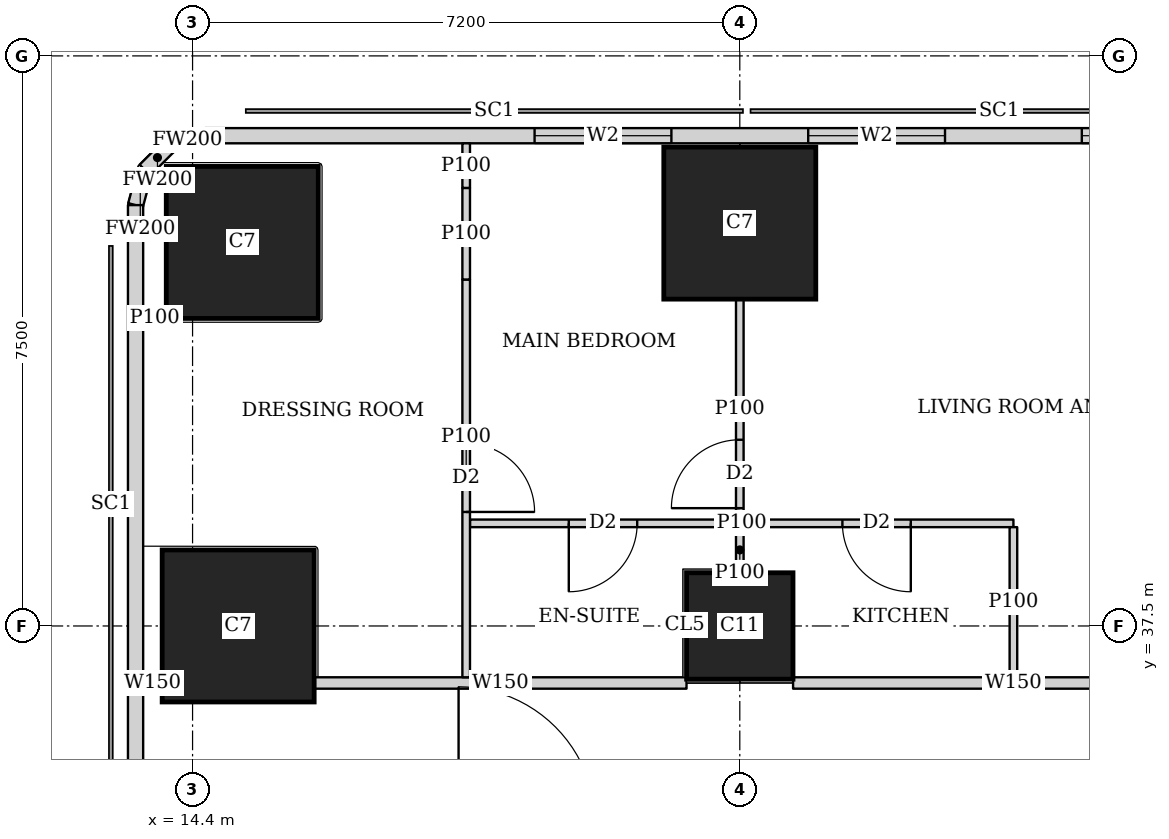
"""IFC4 building model, lengths in metres.
Left out: names, types, materials, properties, quantities, classifications, styles, units other than length and angle.
Written with IfcOpenShell. Run it as: python <this file> out.ifc"""

import sys

from ifc_helpers import new_model, si_unit, direction, frame, frame_2d, origin, origin_2d, place, context, subcontext, project, spatial, rectangle, extrude, element, fill, save


model = new_model("IFC4")
c1 = context("Model", 3, precision=1e-05, world=origin(), true_north=direction((0.0, 1.0)))
c2 = subcontext(c1, "Body", "Model", "MODEL_VIEW")
j1 = project(units=[si_unit("LENGTHUNIT", "METRE"), si_unit("PLANEANGLEUNIT", "RADIAN")], contexts=[c1])
p1 = place(None, origin())
s1 = spatial("IfcSite", under=j1, at=p1, CompositionType="ELEMENT")
p2 = place(p1, origin())
s2 = spatial("IfcBuilding", under=s1, at=p2, CompositionType="ELEMENT")
p3 = place(p2, frame((0.0, 0.0, 285.35)))
s3 = spatial("IfcBuildingStorey", under=s2, at=p3, CompositionType="ELEMENT", Elevation=285.35)
p4 = place(p3, frame((15.0, 37.5, 0.0), z_axis=(0.0, 0.0, 1.0), x_axis=(1.0, 0.0, 0.0)))
e1 = element("IfcColumn", 1, at=p4, inside=s3, PredefinedType="COLUMN", context=c2, shape_type="SweptSolid", body=[
    extrude(rectangle(XDim=2.0, YDim=2.0, at=origin_2d()), origin(), (0.0, 0.0, 1.0), 3.75),
])
p5 = place(p3, frame((21.6, 37.5, 0.0), z_axis=(0.0, 0.0, 1.0), x_axis=(1.0, 0.0, 0.0)))
e2 = element("IfcColumn", 2, at=p5, inside=s3, PredefinedType="COLUMN", context=c2, shape_type="SweptSolid", body=[
    extrude(rectangle(XDim=1.4, YDim=1.4, at=origin_2d()), origin(), (0.0, 0.0, 1.0), 3.75),
])
for number, where, z_axis, x_axis in (
    (3, (15.054, 42.546, 0.0), (0.0, 0.0, 1.0), (1.0, 0.0, 0.0)),
    (4, (21.6, 42.8, 0.0), (0.0, 0.0, 1.0), (1.0, 0.0, 0.0)),
):
    element("IfcColumn", number, at=place(p3, frame(where, z_axis=z_axis, x_axis=x_axis)), inside=s3, PredefinedType="COLUMN", context=c2, shape_type="SweptSolid", body=[
        extrude(rectangle(XDim=2.0, YDim=2.0, at=origin_2d()), origin(), (0.0, 0.0, 1.0), 3.75),
    ])
p6 = place(p3, frame((42.103, 43.95, 0.0), z_axis=(0.0, 0.0, 1.0), x_axis=(-1.0, 0.0, 0.0)))
e5 = element("IfcWall", 5, at=p6, inside=s3, PredefinedType="SOLIDWALL", context=c2, shape_type="SweptSolid", body=[
    extrude(rectangle(XDim=27.54, YDim=0.2, at=frame_2d((13.77, 0.0))), origin(), (0.0, 0.0, 1.0), 3.5),
])
p7 = place(p6, frame((10.603, 0.0, 0.9)))
e6 = element("IfcOpeningElement", 6, at=p7, cuts=e5, PredefinedType="OPENING", context=c2, shape_type="SweptSolid", body=[
    extrude(rectangle(XDim=1.8, YDim=1.5, at=frame_2d((0.9, 0.75))), frame((0.0, 0.11, 0.0), z_axis=(0.0, -1.0, 0.0), x_axis=(1.0, 0.0, 0.0)), (0.0, 0.0, 1.0), 0.22),
])
p8 = place(p6, frame((14.203, 0.0, 0.9)))
e7 = element("IfcOpeningElement", 7, at=p8, cuts=e5, PredefinedType="OPENING", context=c2, shape_type="SweptSolid", body=[
    extrude(rectangle(XDim=1.8, YDim=1.5, at=frame_2d((0.9, 0.75))), frame((0.0, 0.11, 0.0), z_axis=(0.0, -1.0, 0.0), x_axis=(1.0, 0.0, 0.0)), (0.0, 0.0, 1.0), 0.22),
])
p9 = place(p6, frame((17.803, 0.0, 0.9)))
e8 = element("IfcOpeningElement", 8, at=p9, cuts=e5, PredefinedType="OPENING", context=c2, shape_type="SweptSolid", body=[
    extrude(rectangle(XDim=1.8, YDim=1.5, at=frame_2d((0.9, 0.75))), frame((0.0, 0.11, 0.0), z_axis=(0.0, -1.0, 0.0), x_axis=(1.0, 0.0, 0.0)), (0.0, 0.0, 1.0), 0.22),
])
p10 = place(p6, frame((21.403, 0.0, 0.9)))
e9 = element("IfcOpeningElement", 9, at=p10, cuts=e5, PredefinedType="OPENING", context=c2, shape_type="SweptSolid", body=[
    extrude(rectangle(XDim=1.8, YDim=1.5, at=frame_2d((0.9, 0.75))), frame((0.0, 0.11, 0.0), z_axis=(0.0, -1.0, 0.0), x_axis=(1.0, 0.0, 0.0)), (0.0, 0.0, 1.0), 0.22),
])
p11 = place(p3, frame((14.563, 43.95, 0.0), z_axis=(0.0, 0.0, 1.0), x_axis=(-0.965655254015, -0.259826731483, 0.0)))
e10 = element("IfcWall", 10, at=p11, inside=s3, PredefinedType="SOLIDWALL", context=c2, shape_type="SweptSolid", body=[
    extrude(rectangle(XDim=0.477, YDim=0.2, at=frame_2d((0.239, 0.0))), origin(), (0.0, 0.0, 1.0), 3.5),
])
p12 = place(p3, frame((14.102, 43.826, 0.0), z_axis=(0.0, 0.0, 1.0), x_axis=(-0.707369890659, -0.706843573776, 0.0)))
e11 = element("IfcWall", 11, at=p12, inside=s3, PredefinedType="SOLIDWALL", context=c2, shape_type="SweptSolid", body=[
    extrude(rectangle(XDim=0.464, YDim=0.2, at=frame_2d((0.232, 0.0))), origin(), (0.0, 0.0, 1.0), 3.5),
])
p13 = place(p3, frame((13.774, 43.498, 0.0), z_axis=(0.0, 0.0, 1.0), x_axis=(-0.259826731483, -0.965655254015, 0.0)))
e12 = element("IfcWall", 12, at=p13, inside=s3, PredefinedType="SOLIDWALL", context=c2, shape_type="SweptSolid", body=[
    extrude(rectangle(XDim=0.477, YDim=0.2, at=frame_2d((0.239, 0.0))), origin(), (0.0, 0.0, 1.0), 3.5),
])
p14 = place(p3, frame((13.65, 43.037, 0.0), z_axis=(0.0, 0.0, 1.0), x_axis=(0.0, -1.0, 0.0)))
e13 = element("IfcWall", 13, at=p14, inside=s3, PredefinedType="SOLIDWALL", context=c2, shape_type="SweptSolid", body=[
    extrude(rectangle(XDim=35.374, YDim=0.2, at=frame_2d((17.687, 0.0))), origin(), (0.0, 0.0, 1.0), 3.5),
])
p15 = place(p3, frame((13.75, 36.75, 0.0), z_axis=(0.0, 0.0, 1.0), x_axis=(1.0, 0.0, 0.0)))
e14 = element("IfcWall", 14, at=p15, inside=s3, PredefinedType="SOLIDWALL", context=c2, shape_type="SweptSolid", body=[
    extrude(rectangle(XDim=0.249, YDim=0.15, at=frame_2d((0.125, 0.0))), origin(), (0.0, 0.0, 1.0), 3.5),
])
p16 = place(p3, frame((16.001, 36.75, 0.0), z_axis=(0.0, 0.0, 1.0), x_axis=(1.0, 0.0, 0.0)))
e15 = element("IfcWall", 15, at=p16, inside=s3, PredefinedType="SOLIDWALL", context=c2, shape_type="SweptSolid", body=[
    extrude(rectangle(XDim=4.898, YDim=0.15, at=frame_2d((2.449, 0.0))), origin(), (0.0, 0.0, 1.0), 3.5),
])
p17 = place(p3, frame((22.301, 36.75, 0.0), z_axis=(0.0, 0.0, 1.0), x_axis=(1.0, 0.0, 0.0)))
e16 = element("IfcWall", 16, at=p17, inside=s3, PredefinedType="SOLIDWALL", context=c2, shape_type="SweptSolid", body=[
    extrude(rectangle(XDim=5.798, YDim=0.15, at=frame_2d((2.899, 0.0))), origin(), (0.0, 0.0, 1.0), 3.5),
])
p18 = place(p17, frame((4.199, 0.0, 0.0)))
e17 = element("IfcOpeningElement", 17, at=p18, cuts=e16, PredefinedType="OPENING", context=c2, shape_type="SweptSolid", body=[
    extrude(rectangle(XDim=1.0, YDim=2.1, at=frame_2d((0.5, 1.05))), frame((0.0, 0.085, 0.0), z_axis=(0.0, -1.0, 0.0), x_axis=(1.0, 0.0, 0.0)), (0.0, 0.0, 1.0), 0.17),
])
p19 = place(p3, frame((14.054, 41.546, 0.0), z_axis=(0.0, 0.0, 1.0), x_axis=(-1.0, 0.0, 0.0)))
e18 = element("IfcWall", 18, at=p19, inside=s3, PredefinedType="PARTITIONING", context=c2, shape_type="SweptSolid", body=[
    extrude(rectangle(XDim=0.304, YDim=0.1, at=frame_2d((0.152, 0.0))), origin(), (0.0, 0.0, 1.0), 3.5),
])
p20 = place(p3, frame((18.0, 36.825, 0.0), z_axis=(0.0, 0.0, 1.0), x_axis=(0.0, 1.0, 0.0)))
e19 = element("IfcWall", 19, at=p20, inside=s3, PredefinedType="PARTITIONING", context=c2, shape_type="SweptSolid", body=[
    extrude(rectangle(XDim=5.233, YDim=0.1, at=frame_2d((2.617, 0.0))), origin(), (0.0, 0.0, 1.0), 3.5),
])
p21 = place(p20, frame((2.175, 0.0, 0.0)))
e20 = element("IfcOpeningElement", 20, at=p21, cuts=e19, PredefinedType="OPENING", context=c2, shape_type="SweptSolid", body=[
    extrude(rectangle(XDim=0.9, YDim=2.1, at=frame_2d((0.45, 1.05))), frame((0.0, 0.06, 0.0), z_axis=(0.0, -1.0, 0.0), x_axis=(1.0, 0.0, 0.0)), (0.0, 0.0, 1.0), 0.12),
])
p22 = place(p3, frame((18.0, 42.058, 0.0), z_axis=(0.0, 0.0, 1.0), x_axis=(0.0, 1.0, 0.0)))
e21 = element("IfcWall", 21, at=p22, inside=s3, PredefinedType="PARTITIONING", context=c2, shape_type="SweptSolid", body=[
    extrude(rectangle(XDim=1.205, YDim=0.1, at=frame_2d((0.603, 0.0))), origin(), (0.0, 0.0, 1.0), 2.05),
])
p23 = place(p3, frame((18.0, 43.263, 0.0), z_axis=(0.0, 0.0, 1.0), x_axis=(0.0, 1.0, 0.0)))
e22 = element("IfcWall", 22, at=p23, inside=s3, PredefinedType="PARTITIONING", context=c2, shape_type="SweptSolid", body=[
    extrude(rectangle(XDim=0.587, YDim=0.1, at=frame_2d((0.293, 0.0))), origin(), (0.0, 0.0, 1.0), 3.5),
])
p24 = place(p3, frame((21.6, 38.9, 0.0), z_axis=(0.0, 0.0, 1.0), x_axis=(0.0, 1.0, 0.0)))
e23 = element("IfcWall", 23, at=p24, inside=s3, PredefinedType="PARTITIONING", context=c2, shape_type="SweptSolid", body=[
    extrude(rectangle(XDim=2.899, YDim=0.1, at=frame_2d((1.45, 0.0))), origin(), (0.0, 0.0, 1.0), 3.5),
])
p25 = place(p24, frame((0.15, 0.0, 0.0)))
e24 = element("IfcOpeningElement", 24, at=p25, cuts=e23, PredefinedType="OPENING", context=c2, shape_type="SweptSolid", body=[
    extrude(rectangle(XDim=0.9, YDim=2.1, at=frame_2d((0.45, 1.05))), frame((0.0, 0.06, 0.0), z_axis=(0.0, -1.0, 0.0), x_axis=(1.0, 0.0, 0.0)), (0.0, 0.0, 1.0), 0.12),
])
p26 = place(p3, frame((21.6, 38.201, 0.0), z_axis=(0.0, 0.0, 1.0), x_axis=(0.0, 1.0, 0.0)))
e25 = element("IfcWall", 25, at=p26, inside=s3, PredefinedType="PARTITIONING", context=c2, shape_type="SweptSolid", body=[
    extrude(rectangle(XDim=0.599, YDim=0.1, at=frame_2d((0.3, 0.0))), origin(), (0.0, 0.0, 1.0), 3.5),
])
p27 = place(p3, frame((25.2, 36.825, 0.0), z_axis=(0.0, 0.0, 1.0), x_axis=(0.0, 1.0, 0.0)))
e26 = element("IfcWall", 26, at=p27, inside=s3, PredefinedType="PARTITIONING", context=c2, shape_type="SweptSolid", body=[
    extrude(rectangle(XDim=1.975, YDim=0.1, at=frame_2d((0.988, 0.0))), origin(), (0.0, 0.0, 1.0), 3.5),
])
p28 = place(p3, frame((18.05, 38.85, 0.0), z_axis=(0.0, 0.0, 1.0), x_axis=(1.0, 0.0, 0.0)))
e27 = element("IfcWall", 27, at=p28, inside=s3, PredefinedType="PARTITIONING", context=c2, shape_type="SweptSolid", body=[
    extrude(rectangle(XDim=7.15, YDim=0.1, at=frame_2d((3.575, 0.0))), origin(), (0.0, 0.0, 1.0), 3.5),
])
p29 = place(p28, frame((1.3, 0.0, 0.0)))
e28 = element("IfcOpeningElement", 28, at=p29, cuts=e27, PredefinedType="OPENING", context=c2, shape_type="SweptSolid", body=[
    extrude(rectangle(XDim=0.9, YDim=2.1, at=frame_2d((0.45, 1.05))), frame((0.0, 0.06, 0.0), z_axis=(0.0, -1.0, 0.0), x_axis=(1.0, 0.0, 0.0)), (0.0, 0.0, 1.0), 0.12),
])
p30 = place(p28, frame((4.9, 0.0, 0.0)))
e29 = element("IfcOpeningElement", 29, at=p30, cuts=e27, PredefinedType="OPENING", context=c2, shape_type="SweptSolid", body=[
    extrude(rectangle(XDim=0.9, YDim=2.1, at=frame_2d((0.45, 1.05))), frame((0.0, 0.06, 0.0), z_axis=(0.0, -1.0, 0.0), x_axis=(1.0, 0.0, 0.0)), (0.0, 0.0, 1.0), 0.12),
])
p31 = place(p8, origin())
e30 = element("IfcWindow", 30, at=p31, inside=s3, PartitioningType="SINGLE_PANEL", PredefinedType="WINDOW", context=c2, shape_type="SweptSolid", body=[
    extrude(rectangle(XDim=1.8, YDim=1.5, at=frame_2d((0.9, 0.75))), frame((0.0, 0.03, 0.0), z_axis=(0.0, -1.0, 0.0), x_axis=(1.0, 0.0, 0.0)), (0.0, 0.0, 1.0), 0.06),
])
fill(e7, e30)
p32 = place(p9, origin())
e31 = element("IfcWindow", 31, at=p32, inside=s3, PartitioningType="SINGLE_PANEL", PredefinedType="WINDOW", context=c2, shape_type="SweptSolid", body=[
    extrude(rectangle(XDim=1.8, YDim=1.5, at=frame_2d((0.9, 0.75))), frame((0.0, 0.03, 0.0), z_axis=(0.0, -1.0, 0.0), x_axis=(1.0, 0.0, 0.0)), (0.0, 0.0, 1.0), 0.06),
])
fill(e8, e31)
p33 = place(p10, origin())
e32 = element("IfcWindow", 32, at=p33, inside=s3, PartitioningType="SINGLE_PANEL", PredefinedType="WINDOW", context=c2, shape_type="SweptSolid", body=[
    extrude(rectangle(XDim=1.8, YDim=1.5, at=frame_2d((0.9, 0.75))), frame((0.0, 0.03, 0.0), z_axis=(0.0, -1.0, 0.0), x_axis=(1.0, 0.0, 0.0)), (0.0, 0.0, 1.0), 0.06),
])
fill(e9, e32)
p34 = place(p25, origin())
e33 = element("IfcDoor", 33, at=p34, inside=s3, OperationType="SINGLE_SWING_LEFT", PredefinedType="DOOR", context=c2, shape_type="SweptSolid", body=[
    extrude(rectangle(XDim=0.9, YDim=2.1, at=frame_2d((0.45, 1.05))), frame((0.0, 0.025, 0.0), z_axis=(0.0, -1.0, 0.0), x_axis=(1.0, 0.0, 0.0)), (0.0, 0.0, 1.0), 0.05),
])
fill(e24, e33)
p35 = place(p21, origin())
e34 = element("IfcDoor", 34, at=p35, inside=s3, OperationType="SINGLE_SWING_RIGHT", PredefinedType="DOOR", context=c2, shape_type="SweptSolid", body=[
    extrude(rectangle(XDim=0.9, YDim=2.1, at=frame_2d((0.45, 1.05))), frame((0.0, 0.025, 0.0), z_axis=(0.0, -1.0, 0.0), x_axis=(1.0, 0.0, 0.0)), (0.0, 0.0, 1.0), 0.05),
])
fill(e20, e34)
p36 = place(p29, origin())
e35 = element("IfcDoor", 35, at=p36, inside=s3, OperationType="SINGLE_SWING_RIGHT", PredefinedType="DOOR", context=c2, shape_type="SweptSolid", body=[
    extrude(rectangle(XDim=0.9, YDim=2.1, at=frame_2d((0.45, 1.05))), frame((0.0, 0.025, 0.0), z_axis=(0.0, -1.0, 0.0), x_axis=(1.0, 0.0, 0.0)), (0.0, 0.0, 1.0), 0.05),
])
fill(e28, e35)
p37 = place(p30, origin())
e36 = element("IfcDoor", 36, at=p37, inside=s3, OperationType="SINGLE_SWING_LEFT", PredefinedType="DOOR", context=c2, shape_type="SweptSolid", body=[
    extrude(rectangle(XDim=0.9, YDim=2.1, at=frame_2d((0.45, 1.05))), frame((0.0, 0.025, 0.0), z_axis=(0.0, -1.0, 0.0), x_axis=(1.0, 0.0, 0.0)), (0.0, 0.0, 1.0), 0.05),
])
fill(e29, e36)
save(model, sys.argv[1])
